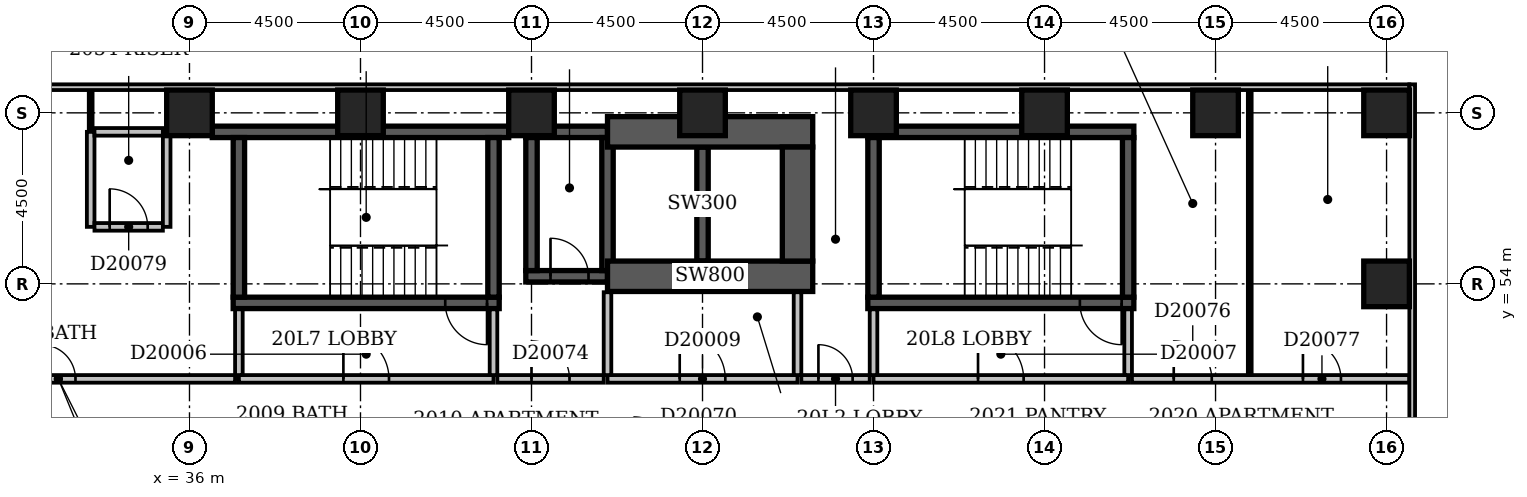
"""IFC4 building model, lengths in metres.
Left out: names, types, materials, properties, quantities, classifications, styles, units other than length and angle.
Written with IfcOpenShell. Run it as: python <this file> out.ifc"""

import sys

from ifc_helpers import new_model, si_unit, direction, frame, frame_2d, origin, origin_2d, place, context, subcontext, project, spatial, rectangle, extrude, element, fill, save


model = new_model("IFC4")
c1 = context("Model", 3, precision=1e-05, world=origin(), true_north=direction((0.0, 1.0)))
c2 = subcontext(c1, "Body", "Model", "MODEL_VIEW")
j1 = project(units=[si_unit("LENGTHUNIT", "METRE"), si_unit("PLANEANGLEUNIT", "RADIAN")], contexts=[c1])
p1 = place(None, origin())
s1 = spatial("IfcSite", under=j1, at=p1, CompositionType="ELEMENT")
p2 = place(p1, origin())
s2 = spatial("IfcBuilding", under=s1, at=p2, CompositionType="ELEMENT")
p3 = place(p2, frame((0.0, 0.0, 83.0)))
s3 = spatial("IfcBuildingStorey", under=s2, at=p3, CompositionType="ELEMENT", Elevation=83.0)
p4 = place(p3, frame((36.6, 58.0, -0.3), z_axis=(0.0, 0.0, 1.0), x_axis=(1.0, 0.0, 0.0)))
e1 = element("IfcWall", 1, at=p4, inside=s3, PredefinedType="SHEAR", context=c2, shape_type="SweptSolid", body=[
    extrude(rectangle(XDim=7.8, YDim=0.3, at=frame_2d((3.9, 0.0))), origin(), (0.0, 0.0, 1.0), 3.6),
])
p5 = place(p3, frame((37.15, 53.5, -0.3), z_axis=(0.0, 0.0, 1.0), x_axis=(1.0, 0.0, 0.0)))
e2 = element("IfcWall", 2, at=p5, inside=s3, PredefinedType="SHEAR", context=c2, shape_type="SweptSolid", body=[
    extrude(rectangle(XDim=7.0, YDim=0.3, at=frame_2d((3.5, 0.0))), origin(), (0.0, 0.0, 1.0), 3.6),
])
p6 = place(p5, frame((5.58, 0.0, 0.3)))
e3 = element("IfcOpeningElement", 3, at=p6, cuts=e2, PredefinedType="OPENING", context=c2, shape_type="SweptSolid", body=[
    extrude(rectangle(XDim=1.1, YDim=2.1, at=frame_2d((0.55, 1.05))), frame((0.0, 0.162, 0.0), z_axis=(0.0, -1.0, 0.0), x_axis=(1.0, 0.0, 0.0)), (0.0, 0.0, 1.0), 0.324),
])
for number, where, z_axis, x_axis in (
    (4, (37.3, 53.65, -0.3), (0.0, 0.0, 1.0), (0.0, 1.0, 0.0)),
    (5, (44.0, 53.65, -0.3), (0.0, 0.0, 1.0), (0.0, 1.0, 0.0)),
):
    element("IfcWall", number, at=place(p3, frame(where, z_axis=z_axis, x_axis=x_axis)), inside=s3, PredefinedType="SHEAR", context=c2, shape_type="SweptSolid", body=[
        extrude(rectangle(XDim=4.2, YDim=0.3, at=frame_2d((2.1, 0.0))), origin(), (0.0, 0.0, 1.0), 3.6),
    ])
p7 = place(p3, frame((44.85, 54.2, -0.3), z_axis=(0.0, 0.0, 1.0), x_axis=(1.0, 0.0, 0.0)))
e6 = element("IfcWall", 6, at=p7, inside=s3, PredefinedType="SHEAR", context=c2, shape_type="SweptSolid", body=[
    extrude(rectangle(XDim=2.15, YDim=0.3, at=frame_2d((1.075, 0.0))), origin(), (0.0, 0.0, 1.0), 3.6),
])
p8 = place(p7, frame((0.65, 0.0, 0.3)))
e7 = element("IfcOpeningElement", 7, at=p8, cuts=e6, PredefinedType="OPENING", context=c2, shape_type="SweptSolid", body=[
    extrude(rectangle(XDim=1.0, YDim=2.1, at=frame_2d((0.5, 1.05))), frame((0.0, 0.162, 0.0), z_axis=(0.0, -1.0, 0.0), x_axis=(1.0, 0.0, 0.0)), (0.0, 0.0, 1.0), 0.324),
])
p9 = place(p3, frame((44.85, 58.0, -0.3), z_axis=(0.0, 0.0, 1.0), x_axis=(1.0, 0.0, 0.0)))
e8 = element("IfcWall", 8, at=p9, inside=s3, PredefinedType="SHEAR", context=c2, shape_type="SweptSolid", body=[
    extrude(rectangle(XDim=2.15, YDim=0.3, at=frame_2d((1.075, 0.0))), origin(), (0.0, 0.0, 1.0), 3.6),
])
p10 = place(p3, frame((45.0, 54.35, -0.3), z_axis=(0.0, 0.0, 1.0), x_axis=(0.0, 1.0, 0.0)))
e9 = element("IfcWall", 9, at=p10, inside=s3, PredefinedType="SHEAR", context=c2, shape_type="SweptSolid", body=[
    extrude(rectangle(XDim=3.5, YDim=0.3, at=frame_2d((1.75, 0.0))), origin(), (0.0, 0.0, 1.0), 3.6),
])
p11 = place(p3, frame((47.0, 54.2, -0.3), z_axis=(0.0, 0.0, 1.0), x_axis=(1.0, 0.0, 0.0)))
e10 = element("IfcWall", 10, at=p11, inside=s3, PredefinedType="SHEAR", context=c2, shape_type="SweptSolid", body=[
    extrude(rectangle(XDim=5.4, YDim=0.8, at=frame_2d((2.7, 0.0))), origin(), (0.0, 0.0, 1.0), 3.6),
])
p12 = place(p3, frame((47.0, 54.35, -0.3), z_axis=(0.0, 0.0, 1.0), x_axis=(0.0, 1.0, 0.0)))
e11 = element("IfcWall", 11, at=p12, inside=s3, PredefinedType="SHEAR", context=c2, shape_type="SweptSolid", body=[
    extrude(rectangle(XDim=3.5, YDim=0.3, at=frame_2d((1.75, 0.0))), origin(), (0.0, 0.0, 1.0), 3.6),
])
p13 = place(p3, frame((47.0, 58.0, -0.3), z_axis=(0.0, 0.0, 1.0), x_axis=(1.0, 0.0, 0.0)))
e12 = element("IfcWall", 12, at=p13, inside=s3, PredefinedType="SHEAR", context=c2, shape_type="SweptSolid", body=[
    extrude(rectangle(XDim=5.4, YDim=0.8, at=frame_2d((2.7, 0.0))), origin(), (0.0, 0.0, 1.0), 3.6),
])
p14 = place(p3, frame((49.5, 54.6, -0.3), z_axis=(0.0, 0.0, 1.0), x_axis=(0.0, 1.0, 0.0)))
e13 = element("IfcWall", 13, at=p14, inside=s3, PredefinedType="SHEAR", context=c2, shape_type="SweptSolid", body=[
    extrude(rectangle(XDim=3.0, YDim=0.3, at=frame_2d((1.5, 0.0))), origin(), (0.0, 0.0, 1.0), 3.6),
])
p15 = place(p3, frame((52.0, 54.6, -0.3), z_axis=(0.0, 0.0, 1.0), x_axis=(0.0, 1.0, 0.0)))
e14 = element("IfcWall", 14, at=p15, inside=s3, PredefinedType="SHEAR", context=c2, shape_type="SweptSolid", body=[
    extrude(rectangle(XDim=3.0, YDim=0.8, at=frame_2d((1.5, 0.0))), origin(), (0.0, 0.0, 1.0), 3.6),
])
p16 = place(p3, frame((53.85, 53.5, -0.3), z_axis=(0.0, 0.0, 1.0), x_axis=(1.0, 0.0, 0.0)))
e15 = element("IfcWall", 15, at=p16, inside=s3, PredefinedType="SHEAR", context=c2, shape_type="SweptSolid", body=[
    extrude(rectangle(XDim=7.0, YDim=0.3, at=frame_2d((3.5, 0.0))), origin(), (0.0, 0.0, 1.0), 3.6),
])
p17 = place(p16, frame((5.58, 0.0, 0.3)))
e16 = element("IfcOpeningElement", 16, at=p17, cuts=e15, PredefinedType="OPENING", context=c2, shape_type="SweptSolid", body=[
    extrude(rectangle(XDim=1.1, YDim=2.1, at=frame_2d((0.55, 1.05))), frame((0.0, 0.162, 0.0), z_axis=(0.0, -1.0, 0.0), x_axis=(1.0, 0.0, 0.0)), (0.0, 0.0, 1.0), 0.324),
])
p18 = place(p3, frame((53.85, 58.0, -0.3), z_axis=(0.0, 0.0, 1.0), x_axis=(1.0, 0.0, 0.0)))
e17 = element("IfcWall", 17, at=p18, inside=s3, PredefinedType="SHEAR", context=c2, shape_type="SweptSolid", body=[
    extrude(rectangle(XDim=7.0, YDim=0.3, at=frame_2d((3.5, 0.0))), origin(), (0.0, 0.0, 1.0), 3.6),
])
for number, where, z_axis, x_axis in (
    (18, (54.0, 53.65, -0.3), (0.0, 0.0, 1.0), (0.0, 1.0, 0.0)),
    (19, (60.7, 53.65, -0.3), (0.0, 0.0, 1.0), (0.0, 1.0, 0.0)),
):
    element("IfcWall", number, at=place(p3, frame(where, z_axis=z_axis, x_axis=x_axis)), inside=s3, PredefinedType="SHEAR", context=c2, shape_type="SweptSolid", body=[
        extrude(rectangle(XDim=4.2, YDim=0.3, at=frame_2d((2.1, 0.0))), origin(), (0.0, 0.0, 1.0), 3.6),
    ])
for number, where, z_axis, x_axis in (
    (20, (67.5, 54.0, -0.3), (0.0, 0.0, 1.0), (1.0, 0.0, 0.0)),
    (21, (36.0, 58.5, -0.3), (0.0, 0.0, 1.0), (1.0, 0.0, 0.0)),
    (22, (40.5, 58.5, -0.3), (0.0, 0.0, 1.0), (1.0, 0.0, 0.0)),
    (23, (45.0, 58.5, -0.3), (0.0, 0.0, 1.0), (1.0, 0.0, 0.0)),
    (24, (49.5, 58.5, -0.3), (0.0, 0.0, 1.0), (1.0, 0.0, 0.0)),
    (25, (54.0, 58.5, -0.3), (0.0, 0.0, 1.0), (1.0, 0.0, 0.0)),
    (26, (58.5, 58.5, -0.3), (0.0, 0.0, 1.0), (1.0, 0.0, 0.0)),
    (27, (63.0, 58.5, -0.3), (0.0, 0.0, 1.0), (1.0, 0.0, 0.0)),
    (28, (67.5, 58.5, -0.3), (0.0, 0.0, 1.0), (1.0, 0.0, 0.0)),
):
    element("IfcColumn", number, at=place(p3, frame(where, z_axis=z_axis, x_axis=x_axis)), inside=s3, PredefinedType="COLUMN", context=c2, shape_type="SweptSolid", body=[
        extrude(rectangle(XDim=1.2, YDim=1.2, at=origin_2d()), origin(), (0.0, 0.0, 1.0), 3.6),
    ])
p19 = place(p3, frame((68.175, 35.4, 0.0), z_axis=(0.0, 0.0, 1.0), x_axis=(0.0, 1.0, 0.0)))
e29 = element("IfcWall", 29, at=p19, inside=s3, PredefinedType="STANDARD", context=c2, shape_type="SweptSolid", body=[
    extrude(rectangle(XDim=23.85, YDim=0.15, at=frame_2d((11.925, 0.0))), origin(), (0.0, 0.0, 1.0), 2.7),
])
p20 = place(p19, frame((1.65, 0.0, 0.6)))
e30 = element("IfcOpeningElement", 30, at=p20, cuts=e29, PredefinedType="OPENING", context=c2, shape_type="SweptSolid", body=[
    extrude(rectangle(XDim=2.4, YDim=1.8, at=frame_2d((1.2, 0.9))), frame((0.0, 0.087, 0.0), z_axis=(0.0, -1.0, 0.0), x_axis=(1.0, 0.0, 0.0)), (0.0, 0.0, 1.0), 0.174),
])
p21 = place(p3, frame((68.1, 59.175, 0.0), z_axis=(0.0, 0.0, 1.0), x_axis=(-1.0, 0.0, 0.0)))
e31 = element("IfcWall", 31, at=p21, inside=s3, PredefinedType="STANDARD", context=c2, shape_type="SweptSolid", body=[
    extrude(rectangle(XDim=68.85, YDim=0.15, at=frame_2d((34.425, 0.0))), origin(), (0.0, 0.0, 1.0), 2.7),
])
p22 = place(p21, frame((37.65, 0.0, 0.6)))
e32 = element("IfcOpeningElement", 32, at=p22, cuts=e31, PredefinedType="OPENING", context=c2, shape_type="SweptSolid", body=[
    extrude(rectangle(XDim=2.4, YDim=1.8, at=frame_2d((1.2, 0.9))), frame((0.0, 0.087, 0.0), z_axis=(0.0, -1.0, 0.0), x_axis=(1.0, 0.0, 0.0)), (0.0, 0.0, 1.0), 0.174),
])
p23 = place(p3, frame((47.0, 51.5, 0.0), z_axis=(0.0, 0.0, 1.0), x_axis=(1.0, 0.0, 0.0)))
e33 = element("IfcWall", 33, at=p23, inside=s3, PredefinedType="PARTITIONING", context=c2, shape_type="SweptSolid", body=[
    extrude(rectangle(XDim=5.0, YDim=0.2, at=frame_2d((2.5, 0.0))), origin(), (0.0, 0.0, 1.0), 3.3),
])
p24 = place(p23, frame((1.9, 0.0, 0.0)))
e34 = element("IfcOpeningElement", 34, at=p24, cuts=e33, PredefinedType="OPENING", context=c2, shape_type="SweptSolid", body=[
    extrude(rectangle(XDim=1.2, YDim=2.1, at=frame_2d((0.6, 1.05))), frame((0.0, 0.112, 0.0), z_axis=(0.0, -1.0, 0.0), x_axis=(1.0, 0.0, 0.0)), (0.0, 0.0, 1.0), 0.224),
])
for number, where, z_axis, x_axis in (
    (35, (52.0, 51.6, 0.0), (0.0, 0.0, 1.0), (0.0, 1.0, 0.0)),
    (36, (47.0, 51.6, 0.0), (0.0, 0.0, 1.0), (0.0, 1.0, 0.0)),
):
    element("IfcWall", number, at=place(p3, frame(where, z_axis=z_axis, x_axis=x_axis)), inside=s3, PredefinedType="PARTITIONING", context=c2, shape_type="SweptSolid", body=[
        extrude(rectangle(XDim=2.18, YDim=0.2, at=frame_2d((1.09, 0.0))), origin(), (0.0, 0.0, 1.0), 3.3),
    ])
p25 = place(p3, frame((37.3, 51.5, 0.0), z_axis=(0.0, 0.0, 1.0), x_axis=(1.0, 0.0, 0.0)))
e37 = element("IfcWall", 37, at=p25, inside=s3, PredefinedType="PARTITIONING", context=c2, shape_type="SweptSolid", body=[
    extrude(rectangle(XDim=6.7, YDim=0.2, at=frame_2d((3.35, 0.0))), origin(), (0.0, 0.0, 1.0), 3.3),
])
p26 = place(p25, frame((2.75, 0.0, 0.0)))
e38 = element("IfcOpeningElement", 38, at=p26, cuts=e37, PredefinedType="OPENING", context=c2, shape_type="SweptSolid", body=[
    extrude(rectangle(XDim=1.2, YDim=2.1, at=frame_2d((0.6, 1.05))), frame((0.0, 0.112, 0.0), z_axis=(0.0, -1.0, 0.0), x_axis=(1.0, 0.0, 0.0)), (0.0, 0.0, 1.0), 0.224),
])
for number, where, z_axis, x_axis in (
    (39, (44.0, 51.6, 0.0), (0.0, 0.0, 1.0), (0.0, 1.0, 0.0)),
    (40, (37.3, 51.6, 0.0), (0.0, 0.0, 1.0), (0.0, 1.0, 0.0)),
):
    element("IfcWall", number, at=place(p3, frame(where, z_axis=z_axis, x_axis=x_axis)), inside=s3, PredefinedType="PARTITIONING", context=c2, shape_type="SweptSolid", body=[
        extrude(rectangle(XDim=1.73, YDim=0.2, at=frame_2d((0.865, 0.0))), origin(), (0.0, 0.0, 1.0), 3.3),
    ])
p27 = place(p3, frame((54.0, 51.5, 0.0), z_axis=(0.0, 0.0, 1.0), x_axis=(1.0, 0.0, 0.0)))
e41 = element("IfcWall", 41, at=p27, inside=s3, PredefinedType="PARTITIONING", context=c2, shape_type="SweptSolid", body=[
    extrude(rectangle(XDim=6.7, YDim=0.2, at=frame_2d((3.35, 0.0))), origin(), (0.0, 0.0, 1.0), 3.3),
])
p28 = place(p27, frame((2.75, 0.0, 0.0)))
e42 = element("IfcOpeningElement", 42, at=p28, cuts=e41, PredefinedType="OPENING", context=c2, shape_type="SweptSolid", body=[
    extrude(rectangle(XDim=1.2, YDim=2.1, at=frame_2d((0.6, 1.05))), frame((0.0, 0.112, 0.0), z_axis=(0.0, -1.0, 0.0), x_axis=(1.0, 0.0, 0.0)), (0.0, 0.0, 1.0), 0.224),
])
p29 = place(p3, frame((60.7, 51.6, 0.0), z_axis=(0.0, 0.0, 1.0), x_axis=(0.0, 1.0, 0.0)))
e43 = element("IfcWall", 43, at=p29, inside=s3, PredefinedType="PARTITIONING", context=c2, shape_type="SweptSolid", body=[
    extrude(rectangle(XDim=1.73, YDim=0.2, at=frame_2d((0.865, 0.0))), origin(), (0.0, 0.0, 1.0), 3.3),
])
p30 = place(p3, frame((54.0, 51.6, 0.0), z_axis=(0.0, 0.0, 1.0), x_axis=(0.0, 1.0, 0.0)))
e44 = element("IfcWall", 44, at=p30, inside=s3, PredefinedType="PARTITIONING", context=c2, shape_type="SweptSolid", body=[
    extrude(rectangle(XDim=1.73, YDim=0.2, at=frame_2d((0.865, 0.0))), origin(), (0.0, 0.0, 1.0), 2.6),
])
p31 = place(p3, frame((27.9, 51.5, 0.0), z_axis=(0.0, 0.0, 1.0), x_axis=(1.0, 0.0, 0.0)))
e45 = element("IfcWall", 45, at=p31, inside=s3, PredefinedType="PARTITIONING", context=c2, shape_type="SweptSolid", body=[
    extrude(rectangle(XDim=9.3, YDim=0.2, at=frame_2d((4.65, 0.0))), origin(), (0.0, 0.0, 1.0), 3.3),
])
p32 = place(p31, frame((4.2, 0.0, 0.0)))
e46 = element("IfcOpeningElement", 46, at=p32, cuts=e45, PredefinedType="OPENING", context=c2, shape_type="SweptSolid", body=[
    extrude(rectangle(XDim=0.9, YDim=2.1, at=frame_2d((0.45, 1.05))), frame((0.0, 0.112, 0.0), z_axis=(0.0, -1.0, 0.0), x_axis=(1.0, 0.0, 0.0)), (0.0, 0.0, 1.0), 0.224),
])
p33 = place(p3, frame((44.1, 51.5, 0.0), z_axis=(0.0, 0.0, 1.0), x_axis=(1.0, 0.0, 0.0)))
e47 = element("IfcWall", 47, at=p33, inside=s3, PredefinedType="PARTITIONING", context=c2, shape_type="SweptSolid", body=[
    extrude(rectangle(XDim=2.8, YDim=0.2, at=frame_2d((1.4, 0.0))), origin(), (0.0, 0.0, 1.0), 3.3),
])
p34 = place(p33, frame((0.9, 0.0, 0.0)))
e48 = element("IfcOpeningElement", 48, at=p34, cuts=e47, PredefinedType="OPENING", context=c2, shape_type="SweptSolid", body=[
    extrude(rectangle(XDim=1.0, YDim=2.1, at=frame_2d((0.5, 1.05))), frame((0.0, 0.112, 0.0), z_axis=(0.0, -1.0, 0.0), x_axis=(1.0, 0.0, 0.0)), (0.0, 0.0, 1.0), 0.224),
])
p35 = place(p3, frame((52.1, 51.5, 0.0), z_axis=(0.0, 0.0, 1.0), x_axis=(1.0, 0.0, 0.0)))
e49 = element("IfcWall", 49, at=p35, inside=s3, PredefinedType="PARTITIONING", context=c2, shape_type="SweptSolid", body=[
    extrude(rectangle(XDim=1.8, YDim=0.2, at=frame_2d((0.9, 0.0))), origin(), (0.0, 0.0, 1.0), 3.3),
])
p36 = place(p35, frame((0.45, 0.0, 0.0)))
e50 = element("IfcOpeningElement", 50, at=p36, cuts=e49, PredefinedType="OPENING", context=c2, shape_type="SweptSolid", body=[
    extrude(rectangle(XDim=0.9, YDim=2.1, at=frame_2d((0.45, 1.05))), frame((0.0, 0.112, 0.0), z_axis=(0.0, -1.0, 0.0), x_axis=(1.0, 0.0, 0.0)), (0.0, 0.0, 1.0), 0.224),
])
p37 = place(p3, frame((60.8, 51.5, 0.0), z_axis=(0.0, 0.0, 1.0), x_axis=(1.0, 0.0, 0.0)))
e51 = element("IfcWall", 51, at=p37, inside=s3, PredefinedType="PARTITIONING", context=c2, shape_type="SweptSolid", body=[
    extrude(rectangle(XDim=7.3, YDim=0.2, at=frame_2d((3.65, 0.0))), origin(), (0.0, 0.0, 1.0), 3.3),
])
p38 = place(p37, frame((1.1, 0.0, 0.0)))
e52 = element("IfcOpeningElement", 52, at=p38, cuts=e51, PredefinedType="OPENING", context=c2, shape_type="SweptSolid", body=[
    extrude(rectangle(XDim=1.0, YDim=2.1, at=frame_2d((0.5, 1.05))), frame((0.0, 0.112, 0.0), z_axis=(0.0, -1.0, 0.0), x_axis=(1.0, 0.0, 0.0)), (0.0, 0.0, 1.0), 0.224),
])
p39 = place(p37, frame((4.5, 0.0, 0.0)))
e53 = element("IfcOpeningElement", 53, at=p39, cuts=e51, PredefinedType="OPENING", context=c2, shape_type="SweptSolid", body=[
    extrude(rectangle(XDim=1.0, YDim=2.1, at=frame_2d((0.5, 1.05))), frame((0.0, 0.112, 0.0), z_axis=(0.0, -1.0, 0.0), x_axis=(1.0, 0.0, 0.0)), (0.0, 0.0, 1.0), 0.224),
])
p40 = place(p3, frame((63.9, 51.6, 0.0), z_axis=(0.0, 0.0, 1.0), x_axis=(0.0, 1.0, 0.0)))
e54 = element("IfcWall", 54, at=p40, inside=s3, PredefinedType="PARTITIONING", context=c2, shape_type="SweptSolid", body=[
    extrude(rectangle(XDim=7.5, YDim=0.1, at=frame_2d((3.75, 0.0))), origin(), (0.0, 0.0, 1.0), 3.3),
])
p41 = place(p3, frame((33.4, 55.5, 0.0), z_axis=(0.0, 0.0, 1.0), x_axis=(0.0, 1.0, 0.0)))
e55 = element("IfcWall", 55, at=p41, inside=s3, PredefinedType="PARTITIONING", context=c2, shape_type="SweptSolid", body=[
    extrude(rectangle(XDim=2.5, YDim=0.2, at=frame_2d((1.25, 0.0))), origin(), (0.0, 0.0, 1.0), 3.3),
])
p42 = place(p3, frame((33.5, 55.5, 0.0), z_axis=(0.0, 0.0, 1.0), x_axis=(1.0, 0.0, 0.0)))
e56 = element("IfcWall", 56, at=p42, inside=s3, PredefinedType="PARTITIONING", context=c2, shape_type="SweptSolid", body=[
    extrude(rectangle(XDim=1.8, YDim=0.2, at=frame_2d((0.9, 0.0))), origin(), (0.0, 0.0, 1.0), 3.3),
])
p43 = place(p42, frame((0.4, 0.0, 0.0)))
e57 = element("IfcOpeningElement", 57, at=p43, cuts=e56, PredefinedType="OPENING", context=c2, shape_type="SweptSolid", body=[
    extrude(rectangle(XDim=1.0, YDim=2.1, at=frame_2d((0.5, 1.05))), frame((0.0, 0.112, 0.0), z_axis=(0.0, -1.0, 0.0), x_axis=(1.0, 0.0, 0.0)), (0.0, 0.0, 1.0), 0.224),
])
p44 = place(p3, frame((35.4, 55.5, 0.0), z_axis=(0.0, 0.0, 1.0), x_axis=(0.0, 1.0, 0.0)))
e58 = element("IfcWall", 58, at=p44, inside=s3, PredefinedType="PARTITIONING", context=c2, shape_type="SweptSolid", body=[
    extrude(rectangle(XDim=2.5, YDim=0.2, at=frame_2d((1.25, 0.0))), origin(), (0.0, 0.0, 1.0), 2.4),
])
p45 = place(p3, frame((33.4, 58.0, 0.0), z_axis=(0.0, 0.0, 1.0), x_axis=(0.0, 1.0, 0.0)))
e59 = element("IfcWall", 59, at=p45, inside=s3, PredefinedType="PARTITIONING", context=c2, shape_type="SweptSolid", body=[
    extrude(rectangle(XDim=1.1, YDim=0.1, at=frame_2d((0.55, 0.0))), origin(), (0.0, 0.0, 1.0), 3.3),
])
p46 = place(p3, frame((33.5, 58.0, 0.0), z_axis=(0.0, 0.0, 1.0), x_axis=(1.0, 0.0, 0.0)))
e60 = element("IfcWall", 60, at=p46, inside=s3, PredefinedType="PARTITIONING", context=c2, shape_type="SweptSolid", body=[
    extrude(rectangle(XDim=1.8, YDim=0.2, at=frame_2d((0.9, 0.0))), origin(), (0.0, 0.0, 1.0), 3.3),
])
p47 = place(p26, origin())
e61 = element("IfcDoor", 61, at=p47, inside=s3, OperationType="SINGLE_SWING_LEFT", PredefinedType="DOOR", context=c2, shape_type="SweptSolid", body=[
    extrude(rectangle(XDim=1.2, YDim=2.1, at=frame_2d((0.6, 1.05))), frame((0.0, 0.025, 0.0), z_axis=(0.0, -1.0, 0.0), x_axis=(1.0, 0.0, 0.0)), (0.0, 0.0, 1.0), 0.05),
])
fill(e38, e61)
p48 = place(p28, origin())
e62 = element("IfcDoor", 62, at=p48, inside=s3, OperationType="SINGLE_SWING_LEFT", PredefinedType="DOOR", context=c2, shape_type="SweptSolid", body=[
    extrude(rectangle(XDim=1.2, YDim=2.1, at=frame_2d((0.6, 1.05))), frame((0.0, 0.025, 0.0), z_axis=(0.0, -1.0, 0.0), x_axis=(1.0, 0.0, 0.0)), (0.0, 0.0, 1.0), 0.05),
])
fill(e42, e62)
p49 = place(p24, origin())
e63 = element("IfcDoor", 63, at=p49, inside=s3, OperationType="SINGLE_SWING_LEFT", PredefinedType="DOOR", context=c2, shape_type="SweptSolid", body=[
    extrude(rectangle(XDim=1.2, YDim=2.1, at=frame_2d((0.6, 1.05))), frame((0.0, 0.025, 0.0), z_axis=(0.0, -1.0, 0.0), x_axis=(1.0, 0.0, 0.0)), (0.0, 0.0, 1.0), 0.05),
])
fill(e34, e63)
p50 = place(p8, origin())
e64 = element("IfcDoor", 64, at=p50, inside=s3, OperationType="SINGLE_SWING_LEFT", PredefinedType="DOOR", context=c2, shape_type="SweptSolid", body=[
    extrude(rectangle(XDim=1.0, YDim=2.1, at=frame_2d((0.5, 1.05))), frame((0.0, 0.025, 0.0), z_axis=(0.0, -1.0, 0.0), x_axis=(1.0, 0.0, 0.0)), (0.0, 0.0, 1.0), 0.05),
])
fill(e7, e64)
p51 = place(p6, origin())
e65 = element("IfcDoor", 65, at=p51, inside=s3, OperationType="SINGLE_SWING_RIGHT", PredefinedType="DOOR", context=c2, shape_type="SweptSolid", body=[
    extrude(rectangle(XDim=1.1, YDim=2.1, at=frame_2d((0.55, 1.05))), frame((0.0, 0.025, 0.0), z_axis=(0.0, -1.0, 0.0), x_axis=(1.0, 0.0, 0.0)), (0.0, 0.0, 1.0), 0.05),
])
fill(e3, e65)
p52 = place(p17, origin())
e66 = element("IfcDoor", 66, at=p52, inside=s3, OperationType="SINGLE_SWING_RIGHT", PredefinedType="DOOR", context=c2, shape_type="SweptSolid", body=[
    extrude(rectangle(XDim=1.1, YDim=2.1, at=frame_2d((0.55, 1.05))), frame((0.0, 0.025, 0.0), z_axis=(0.0, -1.0, 0.0), x_axis=(1.0, 0.0, 0.0)), (0.0, 0.0, 1.0), 0.05),
])
fill(e16, e66)
p53 = place(p32, origin())
e67 = element("IfcDoor", 67, at=p53, inside=s3, OperationType="SINGLE_SWING_LEFT", PredefinedType="DOOR", context=c2, shape_type="SweptSolid", body=[
    extrude(rectangle(XDim=0.9, YDim=2.1, at=frame_2d((0.45, 1.05))), frame((0.0, 0.025, 0.0), z_axis=(0.0, -1.0, 0.0), x_axis=(1.0, 0.0, 0.0)), (0.0, 0.0, 1.0), 0.05),
])
fill(e46, e67)
p54 = place(p34, origin())
e68 = element("IfcDoor", 68, at=p54, inside=s3, OperationType="SINGLE_SWING_LEFT", PredefinedType="DOOR", context=c2, shape_type="SweptSolid", body=[
    extrude(rectangle(XDim=1.0, YDim=2.1, at=frame_2d((0.5, 1.05))), frame((0.0, 0.025, 0.0), z_axis=(0.0, -1.0, 0.0), x_axis=(1.0, 0.0, 0.0)), (0.0, 0.0, 1.0), 0.05),
])
fill(e48, e68)
p55 = place(p36, origin())
e69 = element("IfcDoor", 69, at=p55, inside=s3, OperationType="SINGLE_SWING_LEFT", PredefinedType="DOOR", context=c2, shape_type="SweptSolid", body=[
    extrude(rectangle(XDim=0.9, YDim=2.1, at=frame_2d((0.45, 1.05))), frame((0.0, 0.025, 0.0), z_axis=(0.0, -1.0, 0.0), x_axis=(1.0, 0.0, 0.0)), (0.0, 0.0, 1.0), 0.05),
])
fill(e50, e69)
p56 = place(p38, origin())
e70 = element("IfcDoor", 70, at=p56, inside=s3, OperationType="SINGLE_SWING_LEFT", PredefinedType="DOOR", context=c2, shape_type="SweptSolid", body=[
    extrude(rectangle(XDim=1.0, YDim=2.1, at=frame_2d((0.5, 1.05))), frame((0.0, 0.025, 0.0), z_axis=(0.0, -1.0, 0.0), x_axis=(1.0, 0.0, 0.0)), (0.0, 0.0, 1.0), 0.05),
])
fill(e52, e70)
p57 = place(p39, origin())
e71 = element("IfcDoor", 71, at=p57, inside=s3, OperationType="SINGLE_SWING_LEFT", PredefinedType="DOOR", context=c2, shape_type="SweptSolid", body=[
    extrude(rectangle(XDim=1.0, YDim=2.1, at=frame_2d((0.5, 1.05))), frame((0.0, 0.025, 0.0), z_axis=(0.0, -1.0, 0.0), x_axis=(1.0, 0.0, 0.0)), (0.0, 0.0, 1.0), 0.05),
])
fill(e53, e71)
p58 = place(p43, origin())
e72 = element("IfcDoor", 72, at=p58, inside=s3, OperationType="SINGLE_SWING_LEFT", PredefinedType="DOOR", context=c2, shape_type="SweptSolid", body=[
    extrude(rectangle(XDim=1.0, YDim=2.1, at=frame_2d((0.5, 1.05))), frame((0.0, 0.025, 0.0), z_axis=(0.0, -1.0, 0.0), x_axis=(1.0, 0.0, 0.0)), (0.0, 0.0, 1.0), 0.05),
])
fill(e57, e72)
save(model, sys.argv[1])
